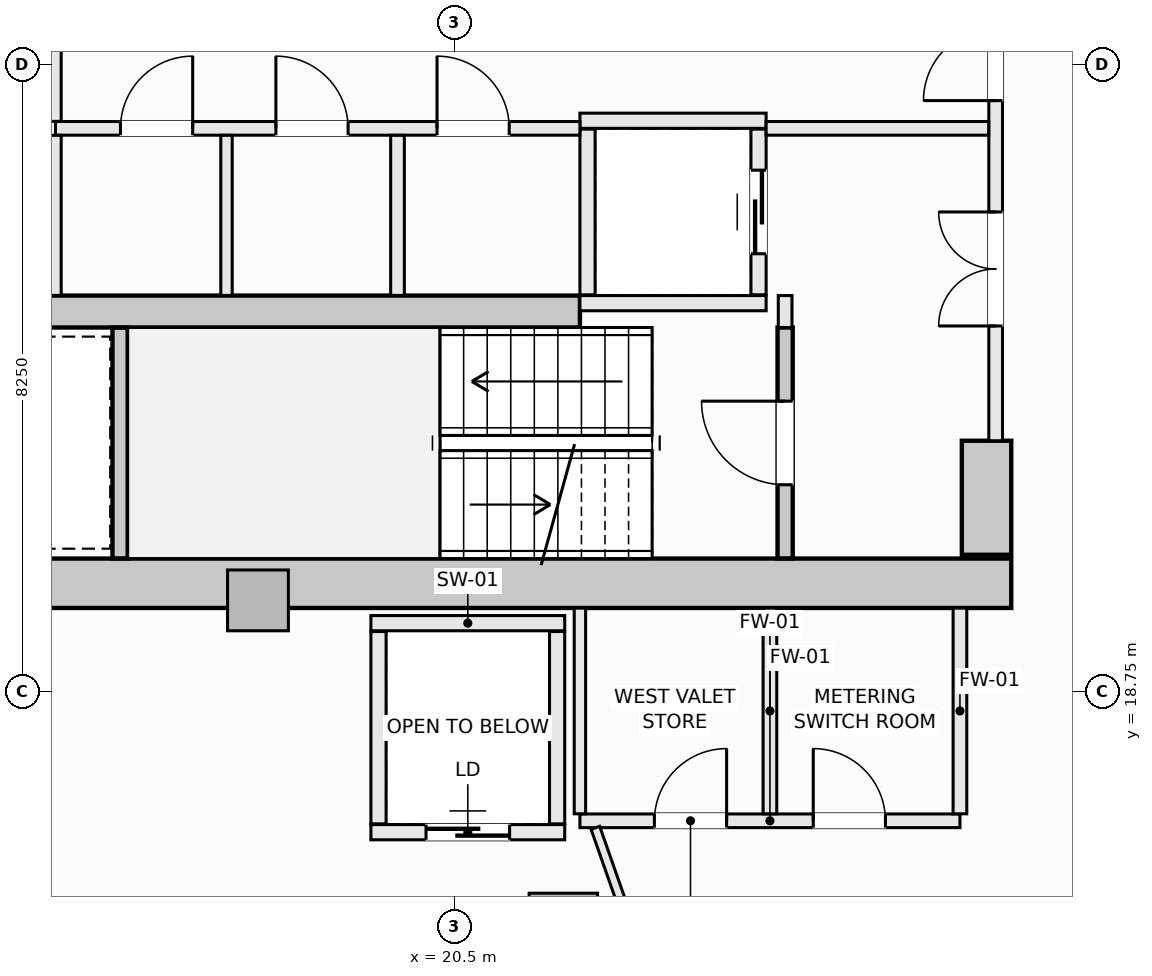
"""IFC4 building model, lengths in metres.
Left out: names, types, materials, properties, quantities, classifications, styles, units other than length and angle.
Written with IfcOpenShell. Run it as: python <this file> out.ifc"""

import sys

from ifc_helpers import new_model, si_unit, direction, frame, frame_2d, origin, origin_2d, place, context, subcontext, project, spatial, rectangle, extrude, element, fill, save


model = new_model("IFC4")
c1 = context("Model", 3, precision=1e-05, world=origin(), true_north=direction((0.0, 1.0)))
c2 = subcontext(c1, "Body", "Model", "MODEL_VIEW")
j1 = project(units=[si_unit("LENGTHUNIT", "METRE"), si_unit("PLANEANGLEUNIT", "RADIAN")], contexts=[c1])
p1 = place(None, origin())
s1 = spatial("IfcSite", under=j1, at=p1, CompositionType="ELEMENT")
p2 = place(p1, origin())
s2 = spatial("IfcBuilding", under=s1, at=p2, CompositionType="ELEMENT")
p3 = place(p2, frame((0.0, 0.0, 122.3)))
s3 = spatial("IfcBuildingStorey", under=s2, at=p3, CompositionType="ELEMENT", Elevation=122.3)
p4 = place(p3, frame((14.175, 20.175, -0.27), z_axis=(0.0, 0.0, 1.0), x_axis=(1.0, 0.0, 0.0)))
e1 = element("IfcWall", 1, at=p4, inside=s3, PredefinedType="SHEAR", context=c2, shape_type="SweptSolid", body=[
    extrude(rectangle(XDim=13.65, YDim=0.65, at=frame_2d((6.825, 0.0))), origin(), (0.0, 0.0, 1.0), 3.4),
])
p5 = place(p3, frame((27.5, 20.55, -0.27), z_axis=(0.0, 0.0, 1.0), x_axis=(0.0, 1.0, 0.0)))
e2 = element("IfcWall", 2, at=p5, inside=s3, PredefinedType="SHEAR", context=c2, shape_type="SweptSolid", body=[
    extrude(rectangle(XDim=1.5, YDim=0.65, at=frame_2d((0.75, 0.0))), origin(), (0.0, 0.0, 1.0), 3.4),
])
p6 = place(p3, frame((14.85, 23.75, -0.27), z_axis=(0.0, 0.0, 1.0), x_axis=(1.0, 0.0, 0.0)))
e3 = element("IfcWall", 3, at=p6, inside=s3, PredefinedType="SHEAR", context=c2, shape_type="SweptSolid", body=[
    extrude(rectangle(XDim=7.3, YDim=0.42, at=frame_2d((3.65, 0.0))), origin(), (0.0, 0.0, 1.0), 3.4),
])
p7 = place(p3, frame((21.932, 15.648, -0.27), z_axis=(0.0, 0.0, 1.0), x_axis=(1.0, 0.0, 0.0)))
e4 = element("IfcColumn", 4, at=p7, inside=s3, PredefinedType="COLUMN", context=c2, shape_type="SweptSolid", body=[
    extrude(rectangle(XDim=0.9, YDim=0.9, at=origin_2d()), origin(), (0.0, 0.0, 1.0), 3.4),
])
p8 = place(p3, frame((17.914, 19.95, -0.27), z_axis=(0.0, 0.0, 1.0), x_axis=(1.0, 0.0, 0.0)))
e5 = element("IfcColumn", 5, at=p8, inside=s3, PredefinedType="PILASTER", context=c2, shape_type="SweptSolid", body=[
    extrude(rectangle(XDim=0.8, YDim=0.8, at=origin_2d()), origin(), (0.0, 0.0, 1.0), 3.4),
])
p9 = place(p3, frame((24.85, 20.502, -0.27), z_axis=(0.0, 0.0, 1.0), x_axis=(0.0, 1.0, 0.0)))
e6 = element("IfcWall", 6, at=p9, inside=s3, PredefinedType="SHEAR", context=c2, shape_type="SweptSolid", body=[
    extrude(rectangle(XDim=3.038, YDim=0.2, at=frame_2d((1.519, 0.0))), origin(), (0.0, 0.0, 1.0), 3.4),
])
p10 = place(p9, frame((0.969, 0.0, 0.27)))
e7 = element("IfcOpeningElement", 7, at=p10, cuts=e6, PredefinedType="OPENING", context=c2, shape_type="SweptSolid", body=[
    extrude(rectangle(XDim=1.1, YDim=2.15, at=frame_2d((0.55, 1.075))), frame((0.0, 0.11, 0.0), z_axis=(0.0, -1.0, 0.0), x_axis=(1.0, 0.0, 0.0)), (0.0, 0.0, 1.0), 0.22),
])
p11 = place(p3, frame((16.1, 20.502, -0.27), z_axis=(0.0, 0.0, 1.0), x_axis=(0.0, 1.0, 0.0)))
e8 = element("IfcWall", 8, at=p11, inside=s3, PredefinedType="SHEAR", context=c2, shape_type="SweptSolid", body=[
    extrude(rectangle(XDim=3.036, YDim=0.2, at=frame_2d((1.518, 0.0))), origin(), (0.0, 0.0, 1.0), 3.4),
])
for number, where, z_axis, x_axis in (
    (9, (22.15, 26.26, 0.0), (0.0, 0.0, 1.0), (1.0, 0.0, 0.0)),
    (10, (22.15, 23.86, 0.0), (0.0, 0.0, 1.0), (1.0, 0.0, 0.0)),
):
    element("IfcWall", number, at=place(p3, frame(where, z_axis=z_axis, x_axis=x_axis)), inside=s3, PredefinedType="SOLIDWALL", context=c2, shape_type="SweptSolid", body=[
        extrude(rectangle(XDim=2.45, YDim=0.2, at=frame_2d((1.225, 0.0))), origin(), (0.0, 0.0, 1.0), 3.13),
    ])
p12 = place(p3, frame((22.25, 23.97, 0.0), z_axis=(0.0, 0.0, 1.0), x_axis=(0.0, 1.0, 0.0)))
e11 = element("IfcWall", 11, at=p12, inside=s3, PredefinedType="SOLIDWALL", context=c2, shape_type="SweptSolid", body=[
    extrude(rectangle(XDim=2.18, YDim=0.2, at=frame_2d((1.09, 0.0))), origin(), (0.0, 0.0, 1.0), 3.13),
])
p13 = place(p3, frame((24.5, 23.97, 0.0), z_axis=(0.0, 0.0, 1.0), x_axis=(0.0, 1.0, 0.0)))
e12 = element("IfcWall", 12, at=p13, inside=s3, PredefinedType="SOLIDWALL", context=c2, shape_type="SweptSolid", body=[
    extrude(rectangle(XDim=2.18, YDim=0.2, at=frame_2d((1.09, 0.0))), origin(), (0.0, 0.0, 1.0), 3.13),
])
p14 = place(p13, frame((0.54, 0.0, 0.0)))
e13 = element("IfcOpeningElement", 13, at=p14, cuts=e12, PredefinedType="OPENING", context=c2, shape_type="SweptSolid", body=[
    extrude(rectangle(XDim=1.1, YDim=2.2, at=frame_2d((0.55, 1.1))), frame((0.0, 0.11, 0.0), z_axis=(0.0, -1.0, 0.0), x_axis=(1.0, 0.0, 0.0)), (0.0, 0.0, 1.0), 0.22),
])
p15 = place(p3, frame((19.4, 19.65, 0.0), z_axis=(0.0, 0.0, 1.0), x_axis=(1.0, 0.0, 0.0)))
e14 = element("IfcWall", 14, at=p15, inside=s3, PredefinedType="SOLIDWALL", context=c2, shape_type="SweptSolid", body=[
    extrude(rectangle(XDim=2.55, YDim=0.2, at=frame_2d((1.275, 0.0))), origin(), (0.0, 0.0, 1.0), 3.13),
])
p16 = place(p3, frame((19.4, 16.9, 0.0), z_axis=(0.0, 0.0, 1.0), x_axis=(1.0, 0.0, 0.0)))
e15 = element("IfcWall", 15, at=p16, inside=s3, PredefinedType="SOLIDWALL", context=c2, shape_type="SweptSolid", body=[
    extrude(rectangle(XDim=2.55, YDim=0.2, at=frame_2d((1.275, 0.0))), origin(), (0.0, 0.0, 1.0), 3.13),
])
p17 = place(p16, frame((0.725, 0.0, 0.0)))
e16 = element("IfcOpeningElement", 16, at=p17, cuts=e15, PredefinedType="OPENING", context=c2, shape_type="SweptSolid", body=[
    extrude(rectangle(XDim=1.1, YDim=2.2, at=frame_2d((0.55, 1.1))), frame((0.0, 0.11, 0.0), z_axis=(0.0, -1.0, 0.0), x_axis=(1.0, 0.0, 0.0)), (0.0, 0.0, 1.0), 0.22),
])
for number, where, z_axis, x_axis in (
    (17, (19.5, 17.01, 0.0), (0.0, 0.0, 1.0), (0.0, 1.0, 0.0)),
    (18, (21.85, 17.01, 0.0), (0.0, 0.0, 1.0), (0.0, 1.0, 0.0)),
):
    element("IfcWall", number, at=place(p3, frame(where, z_axis=z_axis, x_axis=x_axis)), inside=s3, PredefinedType="SOLIDWALL", context=c2, shape_type="SweptSolid", body=[
        extrude(rectangle(XDim=2.53, YDim=0.2, at=frame_2d((1.265, 0.0))), origin(), (0.0, 0.0, 1.0), 3.13),
    ])
p18 = place(p3, frame((24.85, 23.54, 0.0), z_axis=(0.0, 0.0, 1.0), x_axis=(0.0, 1.0, 0.0)))
e19 = element("IfcWall", 19, at=p18, inside=s3, PredefinedType="SOLIDWALL", context=c2, shape_type="SweptSolid", body=[
    extrude(rectangle(XDim=0.42, YDim=0.18, at=frame_2d((0.21, 0.0))), origin(), (0.0, 0.0, 1.0), 3.13),
])
p19 = place(p3, frame((27.62, 22.05, 0.0), z_axis=(0.0, 0.0, 1.0), x_axis=(0.0, 1.0, 0.0)))
e20 = element("IfcWall", 20, at=p19, inside=s3, PredefinedType="SOLIDWALL", context=c2, shape_type="SweptSolid", body=[
    extrude(rectangle(XDim=9.9, YDim=0.18, at=frame_2d((4.95, 0.0))), origin(), (0.0, 0.0, 1.0), 3.13),
])
p20 = place(p19, frame((4.475, 0.0, 0.0)))
e21 = element("IfcOpeningElement", 21, at=p20, cuts=e20, PredefinedType="OPENING", context=c2, shape_type="SweptSolid", body=[
    extrude(rectangle(XDim=0.95, YDim=2.1, at=frame_2d((0.475, 1.05))), frame((0.0, 0.1, 0.0), z_axis=(0.0, -1.0, 0.0), x_axis=(1.0, 0.0, 0.0)), (0.0, 0.0, 1.0), 0.2),
])
p21 = place(p19, frame((6.89, 0.0, 0.0)))
e22 = element("IfcOpeningElement", 22, at=p21, cuts=e20, PredefinedType="OPENING", context=c2, shape_type="SweptSolid", body=[
    extrude(rectangle(XDim=1.5, YDim=2.2, at=frame_2d((0.75, 1.1))), frame((0.0, 0.1, 0.0), z_axis=(0.0, -1.0, 0.0), x_axis=(1.0, 0.0, 0.0)), (0.0, 0.0, 1.0), 0.2),
])
p22 = place(p19, frame((1.51, 0.0, 0.0)))
e23 = element("IfcOpeningElement", 23, at=p22, cuts=e20, PredefinedType="OPENING", context=c2, shape_type="SweptSolid", body=[
    extrude(rectangle(XDim=1.5, YDim=2.2, at=frame_2d((0.75, 1.1))), frame((0.0, 0.1, 0.0), z_axis=(0.0, -1.0, 0.0), x_axis=(1.0, 0.0, 0.0)), (0.0, 0.0, 1.0), 0.2),
])
p23 = place(p3, frame((15.25, 26.16, 0.0), z_axis=(0.0, 0.0, 1.0), x_axis=(1.0, 0.0, 0.0)))
e24 = element("IfcWall", 24, at=p23, inside=s3, PredefinedType="SOLIDWALL", context=c2, shape_type="SweptSolid", body=[
    extrude(rectangle(XDim=6.9, YDim=0.18, at=frame_2d((3.45, 0.0))), origin(), (0.0, 0.0, 1.0), 3.13),
])
p24 = place(p23, frame((5.02, 0.0, 0.0)))
e25 = element("IfcOpeningElement", 25, at=p24, cuts=e24, PredefinedType="OPENING", context=c2, shape_type="SweptSolid", body=[
    extrude(rectangle(XDim=0.95, YDim=2.1, at=frame_2d((0.475, 1.05))), frame((0.0, 0.1, 0.0), z_axis=(0.0, -1.0, 0.0), x_axis=(1.0, 0.0, 0.0)), (0.0, 0.0, 1.0), 0.2),
])
p25 = place(p23, frame((0.855, 0.0, 0.0)))
e26 = element("IfcOpeningElement", 26, at=p25, cuts=e24, PredefinedType="OPENING", context=c2, shape_type="SweptSolid", body=[
    extrude(rectangle(XDim=0.95, YDim=2.1, at=frame_2d((0.475, 1.05))), frame((0.0, 0.1, 0.0), z_axis=(0.0, -1.0, 0.0), x_axis=(1.0, 0.0, 0.0)), (0.0, 0.0, 1.0), 0.2),
])
p26 = place(p23, frame((2.9, 0.0, 0.0)))
e27 = element("IfcOpeningElement", 27, at=p26, cuts=e24, PredefinedType="OPENING", context=c2, shape_type="SweptSolid", body=[
    extrude(rectangle(XDim=0.95, YDim=2.1, at=frame_2d((0.475, 1.05))), frame((0.0, 0.1, 0.0), z_axis=(0.0, -1.0, 0.0), x_axis=(1.0, 0.0, 0.0)), (0.0, 0.0, 1.0), 0.2),
])
p27 = place(p3, frame((24.6, 26.16, 0.0), z_axis=(0.0, 0.0, 1.0), x_axis=(1.0, 0.0, 0.0)))
e28 = element("IfcWall", 28, at=p27, inside=s3, PredefinedType="SOLIDWALL", context=c2, shape_type="SweptSolid", body=[
    extrude(rectangle(XDim=2.928, YDim=0.18, at=frame_2d((1.464, 0.0))), origin(), (0.0, 0.0, 1.0), 3.13),
])
p28 = place(p3, frame((15.25, 23.962, 0.0), z_axis=(0.0, 0.0, 1.0), x_axis=(0.0, 1.0, 0.0)))
e29 = element("IfcWall", 29, at=p28, inside=s3, PredefinedType="PARTITIONING", context=c2, shape_type="SweptSolid", body=[
    extrude(rectangle(XDim=2.106, YDim=0.15, at=frame_2d((1.053, 0.0))), origin(), (0.0, 0.0, 1.0), 3.13),
])
p29 = place(p3, frame((15.25, 26.252, 0.0), z_axis=(0.0, 0.0, 1.0), x_axis=(0.0, 1.0, 0.0)))
e30 = element("IfcWall", 30, at=p29, inside=s3, PredefinedType="PARTITIONING", context=c2, shape_type="SweptSolid", body=[
    extrude(rectangle(XDim=1.496, YDim=0.15, at=frame_2d((0.748, 0.0))), origin(), (0.0, 0.0, 1.0), 3.13),
])
p30 = place(p3, frame((19.75, 23.962, 0.0), z_axis=(0.0, 0.0, 1.0), x_axis=(0.0, 1.0, 0.0)))
e31 = element("IfcWall", 31, at=p30, inside=s3, PredefinedType="SOLIDWALL", context=c2, shape_type="SweptSolid", body=[
    extrude(rectangle(XDim=2.106, YDim=0.18, at=frame_2d((1.053, 0.0))), origin(), (0.0, 0.0, 1.0), 3.13),
])
p31 = place(p3, frame((17.5, 23.962, 0.0), z_axis=(0.0, 0.0, 1.0), x_axis=(0.0, 1.0, 0.0)))
e32 = element("IfcWall", 32, at=p31, inside=s3, PredefinedType="PARTITIONING", context=c2, shape_type="SweptSolid", body=[
    extrude(rectangle(XDim=2.106, YDim=0.15, at=frame_2d((1.053, 0.0))), origin(), (0.0, 0.0, 1.0), 3.13),
])
p32 = place(p3, frame((22.15, 17.05, 0.0), z_axis=(0.0, 0.0, 1.0), x_axis=(1.0, 0.0, 0.0)))
e33 = element("IfcWall", 33, at=p32, inside=s3, PredefinedType="SOLIDWALL", context=c2, shape_type="SweptSolid", body=[
    extrude(rectangle(XDim=5.0, YDim=0.18, at=frame_2d((2.5, 0.0))), origin(), (0.0, 0.0, 1.0), 3.13),
])
p33 = place(p32, frame((0.98, 0.0, 0.0)))
e34 = element("IfcOpeningElement", 34, at=p33, cuts=e33, PredefinedType="OPENING", context=c2, shape_type="SweptSolid", body=[
    extrude(rectangle(XDim=0.95, YDim=2.1, at=frame_2d((0.475, 1.05))), frame((0.0, 0.1, 0.0), z_axis=(0.0, -1.0, 0.0), x_axis=(1.0, 0.0, 0.0)), (0.0, 0.0, 1.0), 0.2),
])
p34 = place(p32, frame((3.07, 0.0, 0.0)))
e35 = element("IfcOpeningElement", 35, at=p34, cuts=e33, PredefinedType="OPENING", context=c2, shape_type="SweptSolid", body=[
    extrude(rectangle(XDim=0.95, YDim=2.1, at=frame_2d((0.475, 1.05))), frame((0.0, 0.1, 0.0), z_axis=(0.0, -1.0, 0.0), x_axis=(1.0, 0.0, 0.0)), (0.0, 0.0, 1.0), 0.2),
])
p35 = place(p3, frame((22.15, 17.142, 0.0), z_axis=(0.0, 0.0, 1.0), x_axis=(0.0, 1.0, 0.0)))
e36 = element("IfcWall", 36, at=p35, inside=s3, PredefinedType="PARTITIONING", context=c2, shape_type="SweptSolid", body=[
    extrude(rectangle(XDim=2.706, YDim=0.15, at=frame_2d((1.353, 0.0))), origin(), (0.0, 0.0, 1.0), 3.13),
])
for number, where, z_axis, x_axis in (
    (37, (24.65, 17.142, 0.0), (0.0, 0.0, 1.0), (0.0, 1.0, 0.0)),
    (38, (27.15, 17.142, 0.0), (0.0, 0.0, 1.0), (0.0, 1.0, 0.0)),
):
    element("IfcWall", number, at=place(p3, frame(where, z_axis=z_axis, x_axis=x_axis)), inside=s3, PredefinedType="SOLIDWALL", context=c2, shape_type="SweptSolid", body=[
        extrude(rectangle(XDim=2.706, YDim=0.18, at=frame_2d((1.353, 0.0))), origin(), (0.0, 0.0, 1.0), 3.13),
    ])
p36 = place(p3, frame((22.353, 16.958, 0.0), z_axis=(0.0, 0.0, 1.0), x_axis=(0.331370038458, -0.943500873138, 0.0)))
e39 = element("IfcWall", 39, at=p36, inside=s3, PredefinedType="PARTITIONING", context=c2, shape_type="SweptSolid", body=[
    extrude(rectangle(XDim=1.216, YDim=0.12, at=frame_2d((0.608, 0.0))), origin(), (0.0, 0.0, 1.0), 3.13),
])
p37 = place(p10, origin())
e40 = element("IfcDoor", 40, at=p37, inside=s3, OperationType="SINGLE_SWING_RIGHT", PredefinedType="DOOR", context=c2, shape_type="SweptSolid", body=[
    extrude(rectangle(XDim=1.1, YDim=2.15, at=frame_2d((0.55, 1.075))), frame((0.0, 0.025, 0.0), z_axis=(0.0, -1.0, 0.0), x_axis=(1.0, 0.0, 0.0)), (0.0, 0.0, 1.0), 0.05),
])
fill(e7, e40)
p38 = place(p14, origin())
e41 = element("IfcDoor", 41, at=p38, inside=s3, OperationType="SLIDING_TO_LEFT", PredefinedType="DOOR", context=c2, shape_type="SweptSolid", body=[
    extrude(rectangle(XDim=1.1, YDim=2.2, at=frame_2d((0.55, 1.1))), frame((0.0, 0.025, 0.0), z_axis=(0.0, -1.0, 0.0), x_axis=(1.0, 0.0, 0.0)), (0.0, 0.0, 1.0), 0.05),
])
fill(e13, e41)
p39 = place(p17, origin())
e42 = element("IfcDoor", 42, at=p39, inside=s3, OperationType="SLIDING_TO_LEFT", PredefinedType="DOOR", context=c2, shape_type="SweptSolid", body=[
    extrude(rectangle(XDim=1.1, YDim=2.2, at=frame_2d((0.55, 1.1))), frame((0.0, 0.025, 0.0), z_axis=(0.0, -1.0, 0.0), x_axis=(1.0, 0.0, 0.0)), (0.0, 0.0, 1.0), 0.05),
])
fill(e16, e42)
p40 = place(p20, origin())
e43 = element("IfcDoor", 43, at=p40, inside=s3, OperationType="SINGLE_SWING_LEFT", PredefinedType="DOOR", context=c2, shape_type="SweptSolid", body=[
    extrude(rectangle(XDim=0.95, YDim=2.1, at=frame_2d((0.475, 1.05))), frame((0.0, 0.025, 0.0), z_axis=(0.0, -1.0, 0.0), x_axis=(1.0, 0.0, 0.0)), (0.0, 0.0, 1.0), 0.05),
])
fill(e21, e43)
p41 = place(p22, origin())
e44 = element("IfcDoor", 44, at=p41, inside=s3, OperationType="DOUBLE_DOOR_SINGLE_SWING", PredefinedType="DOOR", context=c2, shape_type="SweptSolid", body=[
    extrude(rectangle(XDim=1.5, YDim=2.2, at=frame_2d((0.75, 1.1))), frame((0.0, 0.025, 0.0), z_axis=(0.0, -1.0, 0.0), x_axis=(1.0, 0.0, 0.0)), (0.0, 0.0, 1.0), 0.05),
])
fill(e23, e44)
p42 = place(p24, origin())
e45 = element("IfcDoor", 45, at=p42, inside=s3, OperationType="SINGLE_SWING_LEFT", PredefinedType="DOOR", context=c2, shape_type="SweptSolid", body=[
    extrude(rectangle(XDim=0.95, YDim=2.1, at=frame_2d((0.475, 1.05))), frame((0.0, 0.025, 0.0), z_axis=(0.0, -1.0, 0.0), x_axis=(1.0, 0.0, 0.0)), (0.0, 0.0, 1.0), 0.05),
])
fill(e25, e45)
p43 = place(p25, origin())
e46 = element("IfcDoor", 46, at=p43, inside=s3, OperationType="SINGLE_SWING_RIGHT", PredefinedType="DOOR", context=c2, shape_type="SweptSolid", body=[
    extrude(rectangle(XDim=0.95, YDim=2.1, at=frame_2d((0.475, 1.05))), frame((0.0, 0.025, 0.0), z_axis=(0.0, -1.0, 0.0), x_axis=(1.0, 0.0, 0.0)), (0.0, 0.0, 1.0), 0.05),
])
fill(e26, e46)
p44 = place(p26, origin())
e47 = element("IfcDoor", 47, at=p44, inside=s3, OperationType="SINGLE_SWING_LEFT", PredefinedType="DOOR", context=c2, shape_type="SweptSolid", body=[
    extrude(rectangle(XDim=0.95, YDim=2.1, at=frame_2d((0.475, 1.05))), frame((0.0, 0.025, 0.0), z_axis=(0.0, -1.0, 0.0), x_axis=(1.0, 0.0, 0.0)), (0.0, 0.0, 1.0), 0.05),
])
fill(e27, e47)
p45 = place(p33, origin())
e48 = element("IfcDoor", 48, at=p45, inside=s3, OperationType="SINGLE_SWING_RIGHT", PredefinedType="DOOR", context=c2, shape_type="SweptSolid", body=[
    extrude(rectangle(XDim=0.95, YDim=2.1, at=frame_2d((0.475, 1.05))), frame((0.0, 0.025, 0.0), z_axis=(0.0, -1.0, 0.0), x_axis=(1.0, 0.0, 0.0)), (0.0, 0.0, 1.0), 0.05),
])
fill(e34, e48)
p46 = place(p34, origin())
e49 = element("IfcDoor", 49, at=p46, inside=s3, OperationType="SINGLE_SWING_LEFT", PredefinedType="DOOR", context=c2, shape_type="SweptSolid", body=[
    extrude(rectangle(XDim=0.95, YDim=2.1, at=frame_2d((0.475, 1.05))), frame((0.0, 0.025, 0.0), z_axis=(0.0, -1.0, 0.0), x_axis=(1.0, 0.0, 0.0)), (0.0, 0.0, 1.0), 0.05),
])
fill(e35, e49)
save(model, sys.argv[1])
